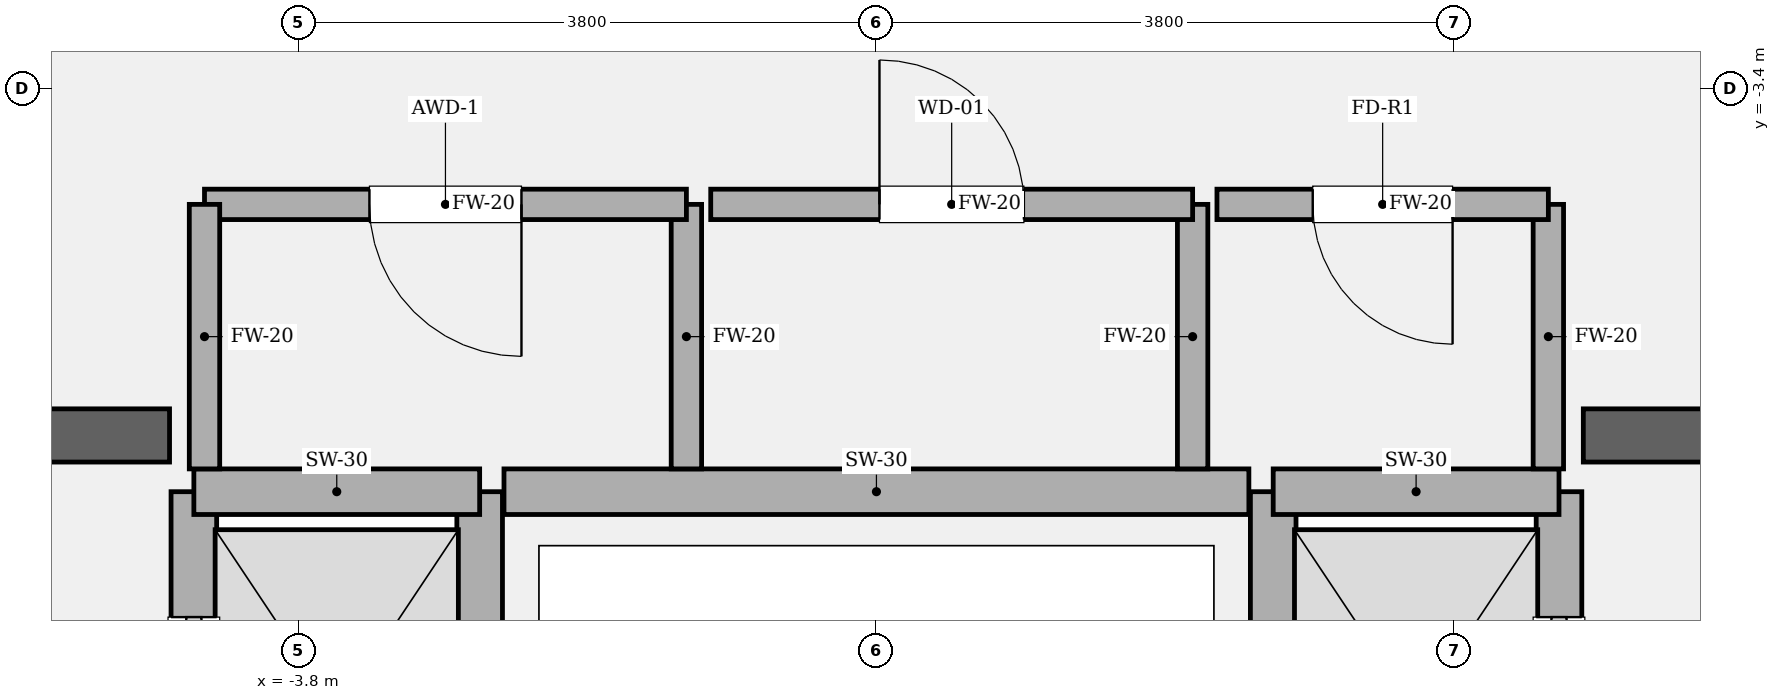
"""IFC4 building model, lengths in metres.
Left out: names, types, materials, properties, quantities, classifications, styles, units other than length and angle.
Written with IfcOpenShell. Run it as: python <this file> out.ifc"""

import sys

from ifc_helpers import new_model, si_unit, direction, frame, frame_2d, origin, place, context, subcontext, project, spatial, rectangle, extrude, element, fill, save


model = new_model("IFC4")
c1 = context("Model", 3, precision=1e-05, world=origin(), true_north=direction((0.0, 1.0)))
c2 = subcontext(c1, "Body", "Model", "MODEL_VIEW")
j1 = project(units=[si_unit("LENGTHUNIT", "METRE"), si_unit("PLANEANGLEUNIT", "RADIAN")], contexts=[c1])
p1 = place(None, origin())
s1 = spatial("IfcSite", under=j1, at=p1, CompositionType="ELEMENT")
p2 = place(p1, origin())
s2 = spatial("IfcBuilding", under=s1, at=p2, CompositionType="ELEMENT")
p3 = place(p2, frame((0.0, 0.0, 56.55)))
s3 = spatial("IfcBuildingStorey", under=s2, at=p3, CompositionType="ELEMENT", Elevation=56.55)
p4 = place(p3, frame((-9.825, -5.68, 0.0), z_axis=(0.0, 0.0, 1.0), x_axis=(1.0, 0.0, 0.0)))
e1 = element("IfcWall", 1, at=p4, inside=s3, PredefinedType="SOLIDWALL", context=c2, shape_type="SweptSolid", body=[
    extrude(rectangle(XDim=5.175, YDim=0.35, at=frame_2d((2.587, 0.0))), origin(), (0.0, 0.0, 1.0), 4.05),
])
p5 = place(p4, frame((1.285, 0.0, 0.0)))
e2 = element("IfcOpeningElement", 2, at=p5, cuts=e1, PredefinedType="OPENING", context=c2, shape_type="SweptSolid", body=[
    extrude(rectangle(XDim=1.18, YDim=2.2, at=frame_2d((0.59, 1.1))), frame((0.0, 0.185, 0.0), z_axis=(0.0, -1.0, 0.0), x_axis=(1.0, 0.0, 0.0)), (0.0, 0.0, 1.0), 0.37),
])
p6 = place(p3, frame((4.65, -5.68, 0.0), z_axis=(0.0, 0.0, 1.0), x_axis=(1.0, 0.0, 0.0)))
e3 = element("IfcWall", 3, at=p6, inside=s3, PredefinedType="SOLIDWALL", context=c2, shape_type="SweptSolid", body=[
    extrude(rectangle(XDim=5.175, YDim=0.35, at=frame_2d((2.587, 0.0))), origin(), (0.0, 0.0, 1.0), 4.05),
])
p7 = place(p6, frame((2.71, 0.0, 0.0)))
e4 = element("IfcOpeningElement", 4, at=p7, cuts=e3, PredefinedType="OPENING", context=c2, shape_type="SweptSolid", body=[
    extrude(rectangle(XDim=1.18, YDim=2.2, at=frame_2d((0.59, 1.1))), frame((0.0, 0.185, 0.0), z_axis=(0.0, -1.0, 0.0), x_axis=(1.0, 0.0, 0.0)), (0.0, 0.0, 1.0), 0.37),
])
p8 = place(p3, frame((-4.49, -8.82, 0.0), z_axis=(0.0, 0.0, 1.0), x_axis=(0.0, 1.0, 0.0)))
e5 = element("IfcWall", 5, at=p8, inside=s3, PredefinedType="SOLIDWALL", context=c2, shape_type="SweptSolid", body=[
    extrude(rectangle(XDim=2.77, YDim=0.3, at=frame_2d((1.385, 0.0))), origin(), (0.0, 0.0, 1.0), 3.77),
])
p9 = place(p8, frame((0.825, 0.0, 0.0)))
e6 = element("IfcOpeningElement", 6, at=p9, cuts=e5, PredefinedType="OPENING", context=c2, shape_type="SweptSolid", body=[
    extrude(rectangle(XDim=1.12, YDim=2.25, at=frame_2d((0.56, 1.125))), frame((0.0, 0.16, 0.0), z_axis=(0.0, -1.0, 0.0), x_axis=(1.0, 0.0, 0.0)), (0.0, 0.0, 1.0), 0.32),
])
p10 = place(p3, frame((-2.61, -8.82, 0.0), z_axis=(0.0, 0.0, 1.0), x_axis=(0.0, 1.0, 0.0)))
e7 = element("IfcWall", 7, at=p10, inside=s3, PredefinedType="SOLIDWALL", context=c2, shape_type="SweptSolid", body=[
    extrude(rectangle(XDim=2.77, YDim=0.3, at=frame_2d((1.385, 0.0))), origin(), (0.0, 0.0, 1.0), 3.77),
])
p11 = place(p3, frame((-4.49, -6.05, 0.0), z_axis=(0.0, 0.0, 1.0), x_axis=(1.0, 0.0, 0.0)))
e8 = element("IfcWall", 8, at=p11, inside=s3, PredefinedType="SOLIDWALL", context=c2, shape_type="SweptSolid", body=[
    extrude(rectangle(XDim=1.88, YDim=0.3, at=frame_2d((0.94, 0.0))), origin(), (0.0, 0.0, 1.0), 3.77),
])
p12 = place(p3, frame((4.49, -8.82, 0.0), z_axis=(0.0, 0.0, 1.0), x_axis=(0.0, 1.0, 0.0)))
e9 = element("IfcWall", 9, at=p12, inside=s3, PredefinedType="SOLIDWALL", context=c2, shape_type="SweptSolid", body=[
    extrude(rectangle(XDim=2.77, YDim=0.3, at=frame_2d((1.385, 0.0))), origin(), (0.0, 0.0, 1.0), 3.77),
])
p13 = place(p12, frame((0.825, 0.0, 0.0)))
e10 = element("IfcOpeningElement", 10, at=p13, cuts=e9, PredefinedType="OPENING", context=c2, shape_type="SweptSolid", body=[
    extrude(rectangle(XDim=1.12, YDim=2.25, at=frame_2d((0.56, 1.125))), frame((0.0, 0.16, 0.0), z_axis=(0.0, -1.0, 0.0), x_axis=(1.0, 0.0, 0.0)), (0.0, 0.0, 1.0), 0.32),
])
p14 = place(p3, frame((2.61, -8.82, 0.0), z_axis=(0.0, 0.0, 1.0), x_axis=(0.0, 1.0, 0.0)))
e11 = element("IfcWall", 11, at=p14, inside=s3, PredefinedType="SOLIDWALL", context=c2, shape_type="SweptSolid", body=[
    extrude(rectangle(XDim=2.77, YDim=0.3, at=frame_2d((1.385, 0.0))), origin(), (0.0, 0.0, 1.0), 3.77),
])
p15 = place(p3, frame((2.61, -6.05, 0.0), z_axis=(0.0, 0.0, 1.0), x_axis=(1.0, 0.0, 0.0)))
e12 = element("IfcWall", 12, at=p15, inside=s3, PredefinedType="SOLIDWALL", context=c2, shape_type="SweptSolid", body=[
    extrude(rectangle(XDim=1.88, YDim=0.3, at=frame_2d((0.94, 0.0))), origin(), (0.0, 0.0, 1.0), 3.77),
])
p16 = place(p3, frame((-2.45, -6.05, 0.0), z_axis=(0.0, 0.0, 1.0), x_axis=(1.0, 0.0, 0.0)))
e13 = element("IfcWall", 13, at=p16, inside=s3, PredefinedType="SOLIDWALL", context=c2, shape_type="SweptSolid", body=[
    extrude(rectangle(XDim=4.9, YDim=0.3, at=frame_2d((2.45, 0.0))), origin(), (0.0, 0.0, 1.0), 3.77),
])
p17 = place(p3, frame((-1.25, -5.9, 0.0), z_axis=(0.0, 0.0, 1.0), x_axis=(0.0, 1.0, 0.0)))
e14 = element("IfcWall", 14, at=p17, inside=s3, PredefinedType="SOLIDWALL", context=c2, shape_type="SweptSolid", body=[
    extrude(rectangle(XDim=1.74, YDim=0.2, at=frame_2d((0.87, 0.0))), origin(), (0.0, 0.0, 1.0), 3.77),
])
p18 = place(p3, frame((-1.25, -4.16, 0.0), z_axis=(0.0, 0.0, 1.0), x_axis=(-1.0, 0.0, 0.0)))
e15 = element("IfcWall", 15, at=p18, inside=s3, PredefinedType="SOLIDWALL", context=c2, shape_type="SweptSolid", body=[
    extrude(rectangle(XDim=3.17, YDim=0.2, at=frame_2d((1.585, 0.0))), origin(), (0.0, 0.0, 1.0), 3.77),
])
p19 = place(p18, frame((1.085, 0.0, 0.0)))
e16 = element("IfcOpeningElement", 16, at=p19, cuts=e15, PredefinedType="OPENING", context=c2, shape_type="SweptSolid", body=[
    extrude(rectangle(XDim=1.0, YDim=2.15, at=frame_2d((0.5, 1.075))), frame((0.0, 0.11, 0.0), z_axis=(0.0, -1.0, 0.0), x_axis=(1.0, 0.0, 0.0)), (0.0, 0.0, 1.0), 0.22),
])
for number, where, z_axis, x_axis in (
    (17, (-4.42, -4.16, 0.0), (0.0, 0.0, 1.0), (0.0, -1.0, 0.0)),
    (18, (2.08, -5.9, 0.0), (0.0, 0.0, 1.0), (0.0, 1.0, 0.0)),
):
    element("IfcWall", number, at=place(p3, frame(where, z_axis=z_axis, x_axis=x_axis)), inside=s3, PredefinedType="SOLIDWALL", context=c2, shape_type="SweptSolid", body=[
        extrude(rectangle(XDim=1.74, YDim=0.2, at=frame_2d((0.87, 0.0))), origin(), (0.0, 0.0, 1.0), 3.77),
    ])
p20 = place(p3, frame((2.08, -4.16, 0.0), z_axis=(0.0, 0.0, 1.0), x_axis=(-1.0, 0.0, 0.0)))
e19 = element("IfcWall", 19, at=p20, inside=s3, PredefinedType="SOLIDWALL", context=c2, shape_type="SweptSolid", body=[
    extrude(rectangle(XDim=3.17, YDim=0.2, at=frame_2d((1.585, 0.0))), origin(), (0.0, 0.0, 1.0), 3.77),
])
p21 = place(p20, frame((1.11, 0.0, 0.0)))
e20 = element("IfcOpeningElement", 20, at=p21, cuts=e19, PredefinedType="OPENING", context=c2, shape_type="SweptSolid", body=[
    extrude(rectangle(XDim=0.95, YDim=2.15, at=frame_2d((0.475, 1.075))), frame((0.0, 0.11, 0.0), z_axis=(0.0, -1.0, 0.0), x_axis=(1.0, 0.0, 0.0)), (0.0, 0.0, 1.0), 0.22),
])
p22 = place(p3, frame((4.42, -5.9, 0.0), z_axis=(0.0, 0.0, 1.0), x_axis=(0.0, 1.0, 0.0)))
e21 = element("IfcWall", 21, at=p22, inside=s3, PredefinedType="SOLIDWALL", context=c2, shape_type="SweptSolid", body=[
    extrude(rectangle(XDim=1.74, YDim=0.2, at=frame_2d((0.87, 0.0))), origin(), (0.0, 0.0, 1.0), 3.77),
])
p23 = place(p3, frame((4.42, -4.16, 0.0), z_axis=(0.0, 0.0, 1.0), x_axis=(-1.0, 0.0, 0.0)))
e22 = element("IfcWall", 22, at=p23, inside=s3, PredefinedType="SOLIDWALL", context=c2, shape_type="SweptSolid", body=[
    extrude(rectangle(XDim=2.18, YDim=0.2, at=frame_2d((1.09, 0.0))), origin(), (0.0, 0.0, 1.0), 3.77),
])
p24 = place(p23, frame((0.63, 0.0, 0.0)))
e23 = element("IfcOpeningElement", 23, at=p24, cuts=e22, PredefinedType="OPENING", context=c2, shape_type="SweptSolid", body=[
    extrude(rectangle(XDim=0.92, YDim=2.1, at=frame_2d((0.46, 1.05))), frame((0.0, 0.11, 0.0), z_axis=(0.0, -1.0, 0.0), x_axis=(1.0, 0.0, 0.0)), (0.0, 0.0, 1.0), 0.22),
])
p25 = place(p9, origin())
e24 = element("IfcDoor", 24, at=p25, inside=s3, OperationType="SLIDING_TO_LEFT", PredefinedType="DOOR", context=c2, shape_type="SweptSolid", body=[
    extrude(rectangle(XDim=1.12, YDim=2.25, at=frame_2d((0.56, 1.125))), frame((0.0, 0.025, 0.0), z_axis=(0.0, -1.0, 0.0), x_axis=(1.0, 0.0, 0.0)), (0.0, 0.0, 1.0), 0.05),
])
fill(e6, e24)
p26 = place(p13, origin())
e25 = element("IfcDoor", 25, at=p26, inside=s3, OperationType="SLIDING_TO_RIGHT", PredefinedType="DOOR", context=c2, shape_type="SweptSolid", body=[
    extrude(rectangle(XDim=1.12, YDim=2.25, at=frame_2d((0.56, 1.125))), frame((0.0, 0.025, 0.0), z_axis=(0.0, -1.0, 0.0), x_axis=(1.0, 0.0, 0.0)), (0.0, 0.0, 1.0), 0.05),
])
fill(e10, e25)
p27 = place(p19, origin())
e26 = element("IfcDoor", 26, at=p27, inside=s3, OperationType="SINGLE_SWING_LEFT", PredefinedType="DOOR", context=c2, shape_type="SweptSolid", body=[
    extrude(rectangle(XDim=1.0, YDim=2.15, at=frame_2d((0.5, 1.075))), frame((0.0, 0.025, 0.0), z_axis=(0.0, -1.0, 0.0), x_axis=(1.0, 0.0, 0.0)), (0.0, 0.0, 1.0), 0.05),
])
fill(e16, e26)
p28 = place(p21, origin())
e27 = element("IfcDoor", 27, at=p28, inside=s3, OperationType="SINGLE_SWING_RIGHT", PredefinedType="DOOR", context=c2, shape_type="SweptSolid", body=[
    extrude(rectangle(XDim=0.95, YDim=2.15, at=frame_2d((0.475, 1.075))), frame((0.0, 0.025, 0.0), z_axis=(0.0, -1.0, 0.0), x_axis=(1.0, 0.0, 0.0)), (0.0, 0.0, 1.0), 0.05),
])
fill(e20, e27)
p29 = place(p24, origin())
e28 = element("IfcDoor", 28, at=p29, inside=s3, OperationType="SINGLE_SWING_LEFT", PredefinedType="DOOR", context=c2, shape_type="SweptSolid", body=[
    extrude(rectangle(XDim=0.92, YDim=2.1, at=frame_2d((0.46, 1.05))), frame((0.0, 0.025, 0.0), z_axis=(0.0, -1.0, 0.0), x_axis=(1.0, 0.0, 0.0)), (0.0, 0.0, 1.0), 0.05),
])
fill(e23, e28)
save(model, sys.argv[1])
